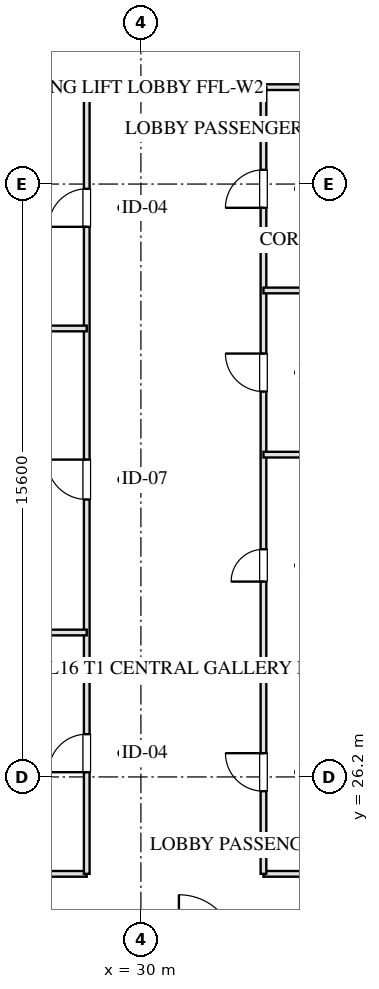
"""IFC4 building model, lengths in metres.
Left out: names, types, materials, properties, quantities, classifications, styles, units other than length and angle.
Written with IfcOpenShell. Run it as: python <this file> out.ifc"""

import sys

from ifc_helpers import new_model, si_unit, direction, frame, frame_2d, origin, place, context, subcontext, project, spatial, rectangle, extrude, element, fill, save


model = new_model("IFC4")
c1 = context("Model", 3, precision=1e-05, world=origin(), true_north=direction((0.0, 1.0)))
c2 = subcontext(c1, "Body", "Model", "MODEL_VIEW")
j1 = project(units=[si_unit("LENGTHUNIT", "METRE"), si_unit("PLANEANGLEUNIT", "RADIAN")], contexts=[c1])
p1 = place(None, origin())
s1 = spatial("IfcSite", under=j1, at=p1, CompositionType="ELEMENT")
p2 = place(p1, origin())
s2 = spatial("IfcBuilding", under=s1, at=p2, CompositionType="ELEMENT")
p3 = place(p2, frame((0.0, 0.0, 67.85)))
s3 = spatial("IfcBuildingStorey", under=s2, at=p3, CompositionType="ELEMENT", Elevation=67.85)
p4 = place(p3, frame((10.6, 23.65, 0.0), z_axis=(0.0, 0.0, 1.0), x_axis=(1.0, 0.0, 0.0)))
e1 = element("IfcWall", 1, at=p4, inside=s3, PredefinedType="PARTITIONING", context=c2, shape_type="SweptSolid", body=[
    extrude(rectangle(XDim=17.975, YDim=0.15, at=frame_2d((8.987, 0.0))), origin(), (0.0, 0.0, 1.0), 3.175),
])
p5 = place(p3, frame((33.225, 23.65, 0.0), z_axis=(0.0, 0.0, 1.0), x_axis=(1.0, 0.0, 0.0)))
e2 = element("IfcWall", 2, at=p5, inside=s3, PredefinedType="PARTITIONING", context=c2, shape_type="SweptSolid", body=[
    extrude(rectangle(XDim=16.175, YDim=0.15, at=frame_2d((8.087, 0.0))), origin(), (0.0, 0.0, 1.0), 3.175),
])
p6 = place(p3, frame((10.6, 44.35, 0.0), z_axis=(0.0, 0.0, 1.0), x_axis=(1.0, 0.0, 0.0)))
e3 = element("IfcWall", 3, at=p6, inside=s3, PredefinedType="PARTITIONING", context=c2, shape_type="SweptSolid", body=[
    extrude(rectangle(XDim=17.975, YDim=0.15, at=frame_2d((8.987, 0.0))), origin(), (0.0, 0.0, 1.0), 3.175),
])
p7 = place(p3, frame((33.225, 44.35, 0.0), z_axis=(0.0, 0.0, 1.0), x_axis=(1.0, 0.0, 0.0)))
e4 = element("IfcWall", 4, at=p7, inside=s3, PredefinedType="PARTITIONING", context=c2, shape_type="SweptSolid", body=[
    extrude(rectangle(XDim=16.175, YDim=0.15, at=frame_2d((8.087, 0.0))), origin(), (0.0, 0.0, 1.0), 3.175),
])
p8 = place(p3, frame((28.575, 23.65, 0.0), z_axis=(0.0, 0.0, 1.0), x_axis=(0.0, 1.0, 0.0)))
e5 = element("IfcWall", 5, at=p8, inside=s3, PredefinedType="PARTITIONING", context=c2, shape_type="SweptSolid", body=[
    extrude(rectangle(XDim=20.7, YDim=0.15, at=frame_2d((10.35, 0.0))), origin(), (0.0, 0.0, 1.0), 3.175),
])
p9 = place(p8, frame((2.675, 0.0, 0.0)))
e6 = element("IfcOpeningElement", 6, at=p9, cuts=e5, PredefinedType="OPENING", context=c2, shape_type="SweptSolid", body=[
    extrude(rectangle(XDim=1.0, YDim=2.05, at=frame_2d((0.5, 1.025))), frame((0.0, 0.085, 0.0), z_axis=(0.0, -1.0, 0.0), x_axis=(1.0, 0.0, 0.0)), (0.0, 0.0, 1.0), 0.17),
])
p10 = place(p8, frame((9.85, 0.0, 0.0)))
e7 = element("IfcOpeningElement", 7, at=p10, cuts=e5, PredefinedType="OPENING", context=c2, shape_type="SweptSolid", body=[
    extrude(rectangle(XDim=1.05, YDim=2.05, at=frame_2d((0.525, 1.025))), frame((0.0, 0.085, 0.0), z_axis=(0.0, -1.0, 0.0), x_axis=(1.0, 0.0, 0.0)), (0.0, 0.0, 1.0), 0.17),
])
p11 = place(p8, frame((17.025, 0.0, 0.0)))
e8 = element("IfcOpeningElement", 8, at=p11, cuts=e5, PredefinedType="OPENING", context=c2, shape_type="SweptSolid", body=[
    extrude(rectangle(XDim=1.0, YDim=2.05, at=frame_2d((0.5, 1.025))), frame((0.0, 0.085, 0.0), z_axis=(0.0, -1.0, 0.0), x_axis=(1.0, 0.0, 0.0)), (0.0, 0.0, 1.0), 0.17),
])
p12 = place(p3, frame((33.225, 23.65, 0.0), z_axis=(0.0, 0.0, 1.0), x_axis=(0.0, 1.0, 0.0)))
e9 = element("IfcWall", 9, at=p12, inside=s3, PredefinedType="PARTITIONING", context=c2, shape_type="SweptSolid", body=[
    extrude(rectangle(XDim=20.7, YDim=0.15, at=frame_2d((10.35, 0.0))), origin(), (0.0, 0.0, 1.0), 3.175),
])
p13 = place(p12, frame((2.175, 0.0, 0.0)))
e10 = element("IfcOpeningElement", 10, at=p13, cuts=e9, PredefinedType="OPENING", context=c2, shape_type="SweptSolid", body=[
    extrude(rectangle(XDim=1.0, YDim=2.05, at=frame_2d((0.5, 1.025))), frame((0.0, 0.085, 0.0), z_axis=(0.0, -1.0, 0.0), x_axis=(1.0, 0.0, 0.0)), (0.0, 0.0, 1.0), 0.17),
])
p14 = place(p12, frame((7.69, 0.0, 0.0)))
e11 = element("IfcOpeningElement", 11, at=p14, cuts=e9, PredefinedType="OPENING", context=c2, shape_type="SweptSolid", body=[
    extrude(rectangle(XDim=0.85, YDim=2.05, at=frame_2d((0.425, 1.025))), frame((0.0, 0.085, 0.0), z_axis=(0.0, -1.0, 0.0), x_axis=(1.0, 0.0, 0.0)), (0.0, 0.0, 1.0), 0.17),
])
p15 = place(p12, frame((12.69, 0.0, 0.0)))
e12 = element("IfcOpeningElement", 12, at=p15, cuts=e9, PredefinedType="OPENING", context=c2, shape_type="SweptSolid", body=[
    extrude(rectangle(XDim=1.0, YDim=2.05, at=frame_2d((0.5, 1.025))), frame((0.0, 0.085, 0.0), z_axis=(0.0, -1.0, 0.0), x_axis=(1.0, 0.0, 0.0)), (0.0, 0.0, 1.0), 0.17),
])
p16 = place(p12, frame((17.525, 0.0, 0.0)))
e13 = element("IfcOpeningElement", 13, at=p16, cuts=e9, PredefinedType="OPENING", context=c2, shape_type="SweptSolid", body=[
    extrude(rectangle(XDim=1.0, YDim=2.05, at=frame_2d((0.5, 1.025))), frame((0.0, 0.085, 0.0), z_axis=(0.0, -1.0, 0.0), x_axis=(1.0, 0.0, 0.0)), (0.0, 0.0, 1.0), 0.17),
])
for number, where, z_axis, x_axis in (
    (14, (10.6, 30.0, 0.0), (0.0, 0.0, 1.0), (1.0, 0.0, 0.0)),
    (15, (10.6, 38.0, 0.0), (0.0, 0.0, 1.0), (1.0, 0.0, 0.0)),
):
    element("IfcWall", number, at=place(p3, frame(where, z_axis=z_axis, x_axis=x_axis)), inside=s3, PredefinedType="PARTITIONING", context=c2, shape_type="SweptSolid", body=[
        extrude(rectangle(XDim=17.975, YDim=0.15, at=frame_2d((8.987, 0.0))), origin(), (0.0, 0.0, 1.0), 3.175),
    ])
for number, where, z_axis, x_axis in (
    (16, (33.225, 29.0, 0.0), (0.0, 0.0, 1.0), (1.0, 0.0, 0.0)),
    (17, (33.225, 34.68, 0.0), (0.0, 0.0, 1.0), (1.0, 0.0, 0.0)),
    (18, (33.225, 39.0, 0.0), (0.0, 0.0, 1.0), (1.0, 0.0, 0.0)),
):
    element("IfcWall", number, at=place(p3, frame(where, z_axis=z_axis, x_axis=x_axis)), inside=s3, PredefinedType="PARTITIONING", context=c2, shape_type="SweptSolid", body=[
        extrude(rectangle(XDim=16.175, YDim=0.15, at=frame_2d((8.087, 0.0))), origin(), (0.0, 0.0, 1.0), 3.175),
    ])
p17 = place(p9, origin())
e19 = element("IfcDoor", 19, at=p17, inside=s3, OperationType="SINGLE_SWING_LEFT", PredefinedType="DOOR", context=c2, shape_type="SweptSolid", body=[
    extrude(rectangle(XDim=1.0, YDim=2.05, at=frame_2d((0.5, 1.025))), frame((0.0, 0.025, 0.0), z_axis=(0.0, -1.0, 0.0), x_axis=(1.0, 0.0, 0.0)), (0.0, 0.0, 1.0), 0.05),
])
fill(e6, e19)
p18 = place(p10, origin())
e20 = element("IfcDoor", 20, at=p18, inside=s3, OperationType="SINGLE_SWING_RIGHT", PredefinedType="DOOR", context=c2, shape_type="SweptSolid", body=[
    extrude(rectangle(XDim=1.05, YDim=2.05, at=frame_2d((0.525, 1.025))), frame((0.0, 0.025, 0.0), z_axis=(0.0, -1.0, 0.0), x_axis=(1.0, 0.0, 0.0)), (0.0, 0.0, 1.0), 0.05),
])
fill(e7, e20)
p19 = place(p11, origin())
e21 = element("IfcDoor", 21, at=p19, inside=s3, OperationType="SINGLE_SWING_LEFT", PredefinedType="DOOR", context=c2, shape_type="SweptSolid", body=[
    extrude(rectangle(XDim=1.0, YDim=2.05, at=frame_2d((0.5, 1.025))), frame((0.0, 0.025, 0.0), z_axis=(0.0, -1.0, 0.0), x_axis=(1.0, 0.0, 0.0)), (0.0, 0.0, 1.0), 0.05),
])
fill(e8, e21)
p20 = place(p13, origin())
e22 = element("IfcDoor", 22, at=p20, inside=s3, OperationType="SINGLE_SWING_RIGHT", PredefinedType="DOOR", context=c2, shape_type="SweptSolid", body=[
    extrude(rectangle(XDim=1.0, YDim=2.05, at=frame_2d((0.5, 1.025))), frame((0.0, 0.025, 0.0), z_axis=(0.0, -1.0, 0.0), x_axis=(1.0, 0.0, 0.0)), (0.0, 0.0, 1.0), 0.05),
])
fill(e10, e22)
p21 = place(p14, origin())
e23 = element("IfcDoor", 23, at=p21, inside=s3, OperationType="SINGLE_SWING_LEFT", PredefinedType="DOOR", context=c2, shape_type="SweptSolid", body=[
    extrude(rectangle(XDim=0.85, YDim=2.05, at=frame_2d((0.425, 1.025))), frame((0.0, 0.025, 0.0), z_axis=(0.0, -1.0, 0.0), x_axis=(1.0, 0.0, 0.0)), (0.0, 0.0, 1.0), 0.05),
])
fill(e11, e23)
p22 = place(p15, origin())
e24 = element("IfcDoor", 24, at=p22, inside=s3, OperationType="SINGLE_SWING_RIGHT", PredefinedType="DOOR", context=c2, shape_type="SweptSolid", body=[
    extrude(rectangle(XDim=1.0, YDim=2.05, at=frame_2d((0.5, 1.025))), frame((0.0, 0.025, 0.0), z_axis=(0.0, -1.0, 0.0), x_axis=(1.0, 0.0, 0.0)), (0.0, 0.0, 1.0), 0.05),
])
fill(e12, e24)
p23 = place(p16, origin())
e25 = element("IfcDoor", 25, at=p23, inside=s3, OperationType="SINGLE_SWING_LEFT", PredefinedType="DOOR", context=c2, shape_type="SweptSolid", body=[
    extrude(rectangle(XDim=1.0, YDim=2.05, at=frame_2d((0.5, 1.025))), frame((0.0, 0.025, 0.0), z_axis=(0.0, -1.0, 0.0), x_axis=(1.0, 0.0, 0.0)), (0.0, 0.0, 1.0), 0.05),
])
fill(e13, e25)
save(model, sys.argv[1])
